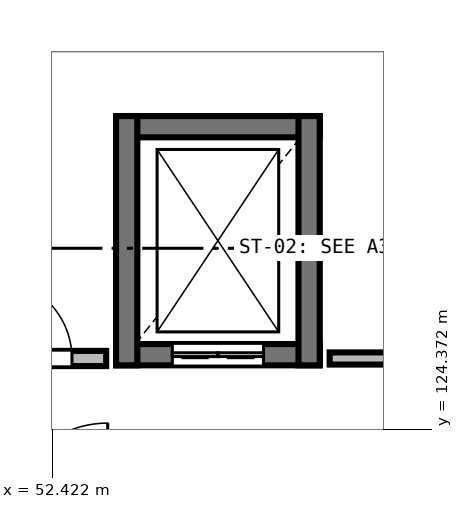
"""IFC4 building model, lengths in metres.
Left out: names, types, materials, properties, quantities, classifications, styles, units other than length and angle.
Written with IfcOpenShell. Run it as: python <this file> out.ifc"""

import sys

from ifc_helpers import new_model, si_unit, direction, frame, frame_2d, origin, place, context, subcontext, project, spatial, rectangle, extrude, element, fill, save


model = new_model("IFC4")
c1 = context("Model", 3, precision=1e-05, world=origin(), true_north=direction((0.0, 1.0)))
c2 = subcontext(c1, "Body", "Model", "MODEL_VIEW")
j1 = project(units=[si_unit("LENGTHUNIT", "METRE"), si_unit("PLANEANGLEUNIT", "RADIAN")], contexts=[c1])
p1 = place(None, origin())
s1 = spatial("IfcSite", under=j1, at=p1, CompositionType="ELEMENT")
p2 = place(p1, origin())
s2 = spatial("IfcBuilding", under=s1, at=p2, CompositionType="ELEMENT")
p3 = place(p2, frame((0.0, 0.0, 13.5)))
s3 = spatial("IfcBuildingStorey", under=s2, at=p3, CompositionType="ELEMENT", Elevation=13.5)
p4 = place(p3, frame((55.94, 125.35, 0.0), z_axis=(0.0, 0.0, 1.0), x_axis=(-1.0, 0.0, 0.0)))
e1 = element("IfcWall", 1, at=p4, inside=s3, PredefinedType="SHEAR", context=c2, shape_type="SweptSolid", body=[
    extrude(rectangle(XDim=2.68, YDim=0.28, at=frame_2d((1.34, 0.0))), origin(), (0.0, 0.0, 1.0), 3.88),
])
p5 = place(p4, frame((0.74, 0.0, 0.0)))
e2 = element("IfcOpeningElement", 2, at=p5, cuts=e1, PredefinedType="OPENING", context=c2, shape_type="SweptSolid", body=[
    extrude(rectangle(XDim=1.2, YDim=2.15, at=frame_2d((0.6, 1.075))), frame((0.0, 0.15, 0.0), z_axis=(0.0, -1.0, 0.0), x_axis=(1.0, 0.0, 0.0)), (0.0, 0.0, 1.0), 0.3),
])
p6 = place(p3, frame((53.26, 128.35, 0.0), z_axis=(0.0, 0.0, 1.0), x_axis=(1.0, 0.0, 0.0)))
e3 = element("IfcWall", 3, at=p6, inside=s3, PredefinedType="SHEAR", context=c2, shape_type="SweptSolid", body=[
    extrude(rectangle(XDim=2.68, YDim=0.28, at=frame_2d((1.34, 0.0))), origin(), (0.0, 0.0, 1.0), 3.88),
])
for number, where, z_axis, x_axis in (
    (4, (53.4, 125.21, 0.0), (0.0, 0.0, 1.0), (0.0, 1.0, 0.0)),
    (5, (55.8, 128.49, 0.0), (0.0, 0.0, 1.0), (0.0, -1.0, 0.0)),
):
    element("IfcWall", number, at=place(p3, frame(where, z_axis=z_axis, x_axis=x_axis)), inside=s3, PredefinedType="SHEAR", context=c2, shape_type="SweptSolid", body=[
        extrude(rectangle(XDim=3.28, YDim=0.28, at=frame_2d((1.64, 0.0))), origin(), (0.0, 0.0, 1.0), 3.88),
    ])
p7 = place(p3, frame((50.4, 125.3, 0.0), z_axis=(0.0, 0.0, 1.0), x_axis=(1.0, 0.0, 0.0)))
e6 = element("IfcWall", 6, at=p7, inside=s3, PredefinedType="SOLIDWALL", context=c2, shape_type="SweptSolid", body=[
    extrude(rectangle(XDim=2.73, YDim=0.2, at=frame_2d((1.365, 0.0))), origin(), (0.0, 0.0, 1.0), 3.355),
])
p8 = place(p7, frame((1.23, 0.0, 0.0)))
e7 = element("IfcOpeningElement", 7, at=p8, cuts=e6, PredefinedType="OPENING", context=c2, shape_type="SweptSolid", body=[
    extrude(rectangle(XDim=1.05, YDim=2.15, at=frame_2d((0.525, 1.075))), frame((0.0, 0.11, 0.0), z_axis=(0.0, -1.0, 0.0), x_axis=(1.0, 0.0, 0.0)), (0.0, 0.0, 1.0), 0.22),
])
p9 = place(p3, frame((56.07, 125.3, 0.0), z_axis=(0.0, 0.0, 1.0), x_axis=(1.0, 0.0, 0.0)))
e8 = element("IfcWall", 8, at=p9, inside=s3, PredefinedType="PARTITIONING", context=c2, shape_type="SweptSolid", body=[
    extrude(rectangle(XDim=36.33, YDim=0.16, at=frame_2d((18.165, 0.0))), origin(), (0.0, 0.0, 1.0), 3.355),
])
p10 = place(p5, origin())
e9 = element("IfcDoor", 9, at=p10, inside=s3, OperationType="DOUBLE_DOOR_SLIDING", PredefinedType="DOOR", context=c2, shape_type="SweptSolid", body=[
    extrude(rectangle(XDim=1.2, YDim=2.15, at=frame_2d((0.6, 1.075))), frame((0.0, 0.025, 0.0), z_axis=(0.0, -1.0, 0.0), x_axis=(1.0, 0.0, 0.0)), (0.0, 0.0, 1.0), 0.05),
])
fill(e2, e9)
p11 = place(p8, origin())
e10 = element("IfcDoor", 10, at=p11, inside=s3, OperationType="SINGLE_SWING_LEFT", PredefinedType="DOOR", context=c2, shape_type="SweptSolid", body=[
    extrude(rectangle(XDim=1.05, YDim=2.15, at=frame_2d((0.525, 1.075))), frame((0.0, 0.025, 0.0), z_axis=(0.0, -1.0, 0.0), x_axis=(1.0, 0.0, 0.0)), (0.0, 0.0, 1.0), 0.05),
])
fill(e7, e10)
save(model, sys.argv[1])
